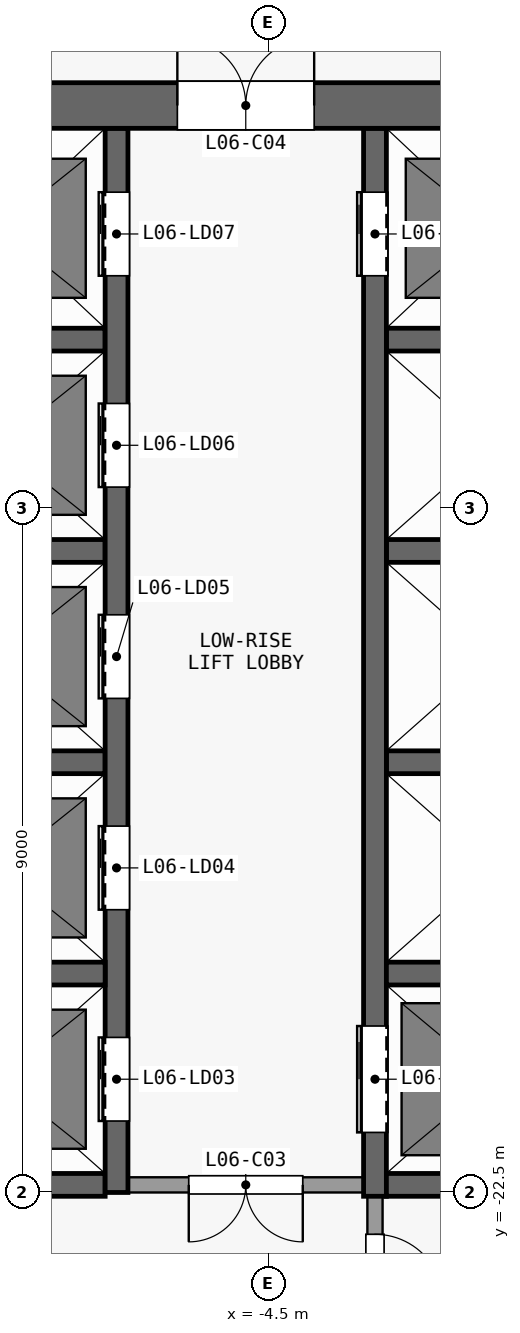
"""IFC4 building model, lengths in metres.
Left out: names, types, materials, properties, quantities, classifications, styles, units other than length and angle.
Written with IfcOpenShell. Run it as: python <this file> out.ifc"""

import sys

from ifc_helpers import new_model, si_unit, direction, frame, frame_2d, origin, place, context, subcontext, project, spatial, rectangle, extrude, element, fill, save


model = new_model("IFC4")
c1 = context("Model", 3, precision=1e-05, world=origin(), true_north=direction((0.0, 1.0)))
c2 = subcontext(c1, "Body", "Model", "MODEL_VIEW")
j1 = project(units=[si_unit("LENGTHUNIT", "METRE"), si_unit("PLANEANGLEUNIT", "RADIAN")], contexts=[c1])
p1 = place(None, origin())
s1 = spatial("IfcSite", under=j1, at=p1, CompositionType="ELEMENT")
p2 = place(p1, origin())
s2 = spatial("IfcBuilding", under=s1, at=p2, CompositionType="ELEMENT")
p3 = place(p2, frame((0.0, 0.0, 32.5)))
s3 = spatial("IfcBuildingStorey", under=s2, at=p3, CompositionType="ELEMENT", Elevation=32.5)
p4 = place(p3, frame((-13.5, -8.2, 0.0), z_axis=(0.0, 0.0, 1.0), x_axis=(1.0, 0.0, 0.0)))
e1 = element("IfcWall", 1, at=p4, inside=s3, PredefinedType="SHEAR", context=c2, shape_type="SweptSolid", body=[
    extrude(rectangle(XDim=27.0, YDim=0.6, at=frame_2d((13.5, 0.0))), origin(), (0.0, 0.0, 1.0), 3.3),
])
p5 = place(p4, frame((7.8, 0.0, 0.0)))
e2 = element("IfcOpeningElement", 2, at=p5, cuts=e1, PredefinedType="OPENING", context=c2, shape_type="SweptSolid", body=[
    extrude(rectangle(XDim=1.8, YDim=2.1, at=frame_2d((0.9, 1.05))), frame((0.0, 0.31, 0.0), z_axis=(0.0, -1.0, 0.0), x_axis=(1.0, 0.0, 0.0)), (0.0, 0.0, 1.0), 0.62),
])
p6 = place(p4, frame((17.4, 0.0, 0.0)))
e3 = element("IfcOpeningElement", 3, at=p6, cuts=e1, PredefinedType="OPENING", context=c2, shape_type="SweptSolid", body=[
    extrude(rectangle(XDim=1.8, YDim=2.1, at=frame_2d((0.9, 1.05))), frame((0.0, 0.31, 0.0), z_axis=(0.0, -1.0, 0.0), x_axis=(1.0, 0.0, 0.0)), (0.0, 0.0, 1.0), 0.62),
])
p7 = place(p4, frame((2.725, 0.0, 0.0)))
e4 = element("IfcOpeningElement", 4, at=p7, cuts=e1, PredefinedType="OPENING", context=c2, shape_type="SweptSolid", body=[
    extrude(rectangle(XDim=0.9, YDim=2.1, at=frame_2d((0.45, 1.05))), frame((0.0, 0.31, 0.0), z_axis=(0.0, -1.0, 0.0), x_axis=(1.0, 0.0, 0.0)), (0.0, 0.0, 1.0), 0.62),
])
p8 = place(p4, frame((23.375, 0.0, 0.0)))
e5 = element("IfcOpeningElement", 5, at=p8, cuts=e1, PredefinedType="OPENING", context=c2, shape_type="SweptSolid", body=[
    extrude(rectangle(XDim=0.9, YDim=2.1, at=frame_2d((0.45, 1.05))), frame((0.0, 0.31, 0.0), z_axis=(0.0, -1.0, 0.0), x_axis=(1.0, 0.0, 0.0)), (0.0, 0.0, 1.0), 0.62),
])
p9 = place(p3, frame((-9.45, -22.4, 0.0), z_axis=(0.0, 0.0, 1.0), x_axis=(1.0, 0.0, 0.0)))
e6 = element("IfcWall", 6, at=p9, inside=s3, PredefinedType="SHEAR", context=c2, shape_type="SweptSolid", body=[
    extrude(rectangle(XDim=2.8, YDim=0.3, at=frame_2d((1.4, 0.0))), origin(), (0.0, 0.0, 1.0), 3.3),
])
p10 = place(p3, frame((-3.25, -22.4, 0.0), z_axis=(0.0, 0.0, 1.0), x_axis=(-1.0, 0.0, 0.0)))
e7 = element("IfcWall", 7, at=p10, inside=s3, PredefinedType="PARTITIONING", context=c2, shape_type="SweptSolid", body=[
    extrude(rectangle(XDim=3.1, YDim=0.2, at=frame_2d((1.55, 0.0))), origin(), (0.0, 0.0, 1.0), 3.3),
])
p11 = place(p10, frame((0.8, 0.0, 0.0)))
e8 = element("IfcOpeningElement", 8, at=p11, cuts=e7, PredefinedType="OPENING", context=c2, shape_type="SweptSolid", body=[
    extrude(rectangle(XDim=1.5, YDim=2.1, at=frame_2d((0.75, 1.05))), frame((0.0, 0.11, 0.0), z_axis=(0.0, -1.0, 0.0), x_axis=(1.0, 0.0, 0.0)), (0.0, 0.0, 1.0), 0.22),
])
p12 = place(p3, frame((-2.95, -22.4, 0.0), z_axis=(0.0, 0.0, 1.0), x_axis=(1.0, 0.0, 0.0)))
e9 = element("IfcWall", 9, at=p12, inside=s3, PredefinedType="SHEAR", context=c2, shape_type="SweptSolid", body=[
    extrude(rectangle(XDim=6.2, YDim=0.3, at=frame_2d((3.1, 0.0))), origin(), (0.0, 0.0, 1.0), 3.3),
])
for number, where, z_axis, x_axis in (
    (10, (-9.45, -19.62, 0.0), (0.0, 0.0, 1.0), (1.0, 0.0, 0.0)),
    (11, (-2.95, -19.62, 0.0), (0.0, 0.0, 1.0), (1.0, 0.0, 0.0)),
    (12, (-9.45, -16.84, 0.0), (0.0, 0.0, 1.0), (1.0, 0.0, 0.0)),
    (13, (-2.95, -16.84, 0.0), (0.0, 0.0, 1.0), (1.0, 0.0, 0.0)),
    (14, (-9.45, -14.06, 0.0), (0.0, 0.0, 1.0), (1.0, 0.0, 0.0)),
    (15, (-2.95, -14.06, 0.0), (0.0, 0.0, 1.0), (1.0, 0.0, 0.0)),
    (16, (-9.45, -11.28, 0.0), (0.0, 0.0, 1.0), (1.0, 0.0, 0.0)),
    (17, (-2.95, -11.28, 0.0), (0.0, 0.0, 1.0), (1.0, 0.0, 0.0)),
):
    element("IfcWall", number, at=place(p3, frame(where, z_axis=z_axis, x_axis=x_axis)), inside=s3, PredefinedType="SHEAR", context=c2, shape_type="SweptSolid", body=[
        extrude(rectangle(XDim=2.8, YDim=0.3, at=frame_2d((1.4, 0.0))), origin(), (0.0, 0.0, 1.0), 3.3),
    ])
p13 = place(p3, frame((-6.5, -22.5, 0.0), z_axis=(0.0, 0.0, 1.0), x_axis=(0.0, 1.0, 0.0)))
e18 = element("IfcWall", 18, at=p13, inside=s3, PredefinedType="SHEAR", context=c2, shape_type="SweptSolid", body=[
    extrude(rectangle(XDim=14.0, YDim=0.3, at=frame_2d((7.0, 0.0))), origin(), (0.0, 0.0, 1.0), 3.3),
])
p14 = place(p13, frame((0.94, 0.0, 0.0)))
e19 = element("IfcOpeningElement", 19, at=p14, cuts=e18, PredefinedType="OPENING", context=c2, shape_type="SweptSolid", body=[
    extrude(rectangle(XDim=1.1, YDim=2.1, at=frame_2d((0.55, 1.05))), frame((0.0, 0.16, 0.0), z_axis=(0.0, -1.0, 0.0), x_axis=(1.0, 0.0, 0.0)), (0.0, 0.0, 1.0), 0.32),
])
p15 = place(p13, frame((3.72, 0.0, 0.0)))
e20 = element("IfcOpeningElement", 20, at=p15, cuts=e18, PredefinedType="OPENING", context=c2, shape_type="SweptSolid", body=[
    extrude(rectangle(XDim=1.1, YDim=2.1, at=frame_2d((0.55, 1.05))), frame((0.0, 0.16, 0.0), z_axis=(0.0, -1.0, 0.0), x_axis=(1.0, 0.0, 0.0)), (0.0, 0.0, 1.0), 0.32),
])
p16 = place(p13, frame((6.5, 0.0, 0.0)))
e21 = element("IfcOpeningElement", 21, at=p16, cuts=e18, PredefinedType="OPENING", context=c2, shape_type="SweptSolid", body=[
    extrude(rectangle(XDim=1.1, YDim=2.1, at=frame_2d((0.55, 1.05))), frame((0.0, 0.16, 0.0), z_axis=(0.0, -1.0, 0.0), x_axis=(1.0, 0.0, 0.0)), (0.0, 0.0, 1.0), 0.32),
])
p17 = place(p13, frame((9.28, 0.0, 0.0)))
e22 = element("IfcOpeningElement", 22, at=p17, cuts=e18, PredefinedType="OPENING", context=c2, shape_type="SweptSolid", body=[
    extrude(rectangle(XDim=1.1, YDim=2.1, at=frame_2d((0.55, 1.05))), frame((0.0, 0.16, 0.0), z_axis=(0.0, -1.0, 0.0), x_axis=(1.0, 0.0, 0.0)), (0.0, 0.0, 1.0), 0.32),
])
p18 = place(p13, frame((12.06, 0.0, 0.0)))
e23 = element("IfcOpeningElement", 23, at=p18, cuts=e18, PredefinedType="OPENING", context=c2, shape_type="SweptSolid", body=[
    extrude(rectangle(XDim=1.1, YDim=2.1, at=frame_2d((0.55, 1.05))), frame((0.0, 0.16, 0.0), z_axis=(0.0, -1.0, 0.0), x_axis=(1.0, 0.0, 0.0)), (0.0, 0.0, 1.0), 0.32),
])
p19 = place(p3, frame((-3.1, -22.55, 0.0), z_axis=(0.0, 0.0, 1.0), x_axis=(0.0, -1.0, 0.0)))
e24 = element("IfcWall", 24, at=p19, inside=s3, PredefinedType="PARTITIONING", context=c2, shape_type="SweptSolid", body=[
    extrude(rectangle(XDim=2.05, YDim=0.2, at=frame_2d((1.025, 0.0))), origin(), (0.0, 0.0, 1.0), 3.3),
])
p20 = place(p19, frame((0.5, 0.0, 0.0)))
e25 = element("IfcOpeningElement", 25, at=p20, cuts=e24, PredefinedType="OPENING", context=c2, shape_type="SweptSolid", body=[
    extrude(rectangle(XDim=0.9, YDim=2.1, at=frame_2d((0.45, 1.05))), frame((0.0, 0.11, 0.0), z_axis=(0.0, -1.0, 0.0), x_axis=(1.0, 0.0, 0.0)), (0.0, 0.0, 1.0), 0.22),
])
p21 = place(p3, frame((-3.1, -22.55, 0.0), z_axis=(0.0, 0.0, 1.0), x_axis=(0.0, 1.0, 0.0)))
e26 = element("IfcWall", 26, at=p21, inside=s3, PredefinedType="SHEAR", context=c2, shape_type="SweptSolid", body=[
    extrude(rectangle(XDim=14.05, YDim=0.3, at=frame_2d((7.025, 0.0))), origin(), (0.0, 0.0, 1.0), 3.3),
])
p22 = place(p21, frame((12.11, 0.0, 0.0)))
e27 = element("IfcOpeningElement", 27, at=p22, cuts=e26, PredefinedType="OPENING", context=c2, shape_type="SweptSolid", body=[
    extrude(rectangle(XDim=1.1, YDim=2.1, at=frame_2d((0.55, 1.05))), frame((0.0, 0.16, 0.0), z_axis=(0.0, -1.0, 0.0), x_axis=(1.0, 0.0, 0.0)), (0.0, 0.0, 1.0), 0.32),
])
p23 = place(p21, frame((0.84, 0.0, 0.0)))
e28 = element("IfcOpeningElement", 28, at=p23, cuts=e26, PredefinedType="OPENING", context=c2, shape_type="SweptSolid", body=[
    extrude(rectangle(XDim=1.4, YDim=2.1, at=frame_2d((0.7, 1.05))), frame((0.0, 0.16, 0.0), z_axis=(0.0, -1.0, 0.0), x_axis=(1.0, 0.0, 0.0)), (0.0, 0.0, 1.0), 0.32),
])
p24 = place(p14, origin())
e29 = element("IfcDoor", 29, at=p24, inside=s3, OperationType="DOUBLE_DOOR_SLIDING", PredefinedType="DOOR", context=c2, shape_type="SweptSolid", body=[
    extrude(rectangle(XDim=1.1, YDim=2.1, at=frame_2d((0.55, 1.05))), frame((0.0, 0.025, 0.0), z_axis=(0.0, -1.0, 0.0), x_axis=(1.0, 0.0, 0.0)), (0.0, 0.0, 1.0), 0.05),
])
fill(e19, e29)
p25 = place(p15, origin())
e30 = element("IfcDoor", 30, at=p25, inside=s3, OperationType="DOUBLE_DOOR_SLIDING", PredefinedType="DOOR", context=c2, shape_type="SweptSolid", body=[
    extrude(rectangle(XDim=1.1, YDim=2.1, at=frame_2d((0.55, 1.05))), frame((0.0, 0.025, 0.0), z_axis=(0.0, -1.0, 0.0), x_axis=(1.0, 0.0, 0.0)), (0.0, 0.0, 1.0), 0.05),
])
fill(e20, e30)
p26 = place(p16, origin())
e31 = element("IfcDoor", 31, at=p26, inside=s3, OperationType="DOUBLE_DOOR_SLIDING", PredefinedType="DOOR", context=c2, shape_type="SweptSolid", body=[
    extrude(rectangle(XDim=1.1, YDim=2.1, at=frame_2d((0.55, 1.05))), frame((0.0, 0.025, 0.0), z_axis=(0.0, -1.0, 0.0), x_axis=(1.0, 0.0, 0.0)), (0.0, 0.0, 1.0), 0.05),
])
fill(e21, e31)
p27 = place(p17, origin())
e32 = element("IfcDoor", 32, at=p27, inside=s3, OperationType="DOUBLE_DOOR_SLIDING", PredefinedType="DOOR", context=c2, shape_type="SweptSolid", body=[
    extrude(rectangle(XDim=1.1, YDim=2.1, at=frame_2d((0.55, 1.05))), frame((0.0, 0.025, 0.0), z_axis=(0.0, -1.0, 0.0), x_axis=(1.0, 0.0, 0.0)), (0.0, 0.0, 1.0), 0.05),
])
fill(e22, e32)
p28 = place(p18, origin())
e33 = element("IfcDoor", 33, at=p28, inside=s3, OperationType="DOUBLE_DOOR_SLIDING", PredefinedType="DOOR", context=c2, shape_type="SweptSolid", body=[
    extrude(rectangle(XDim=1.1, YDim=2.1, at=frame_2d((0.55, 1.05))), frame((0.0, 0.025, 0.0), z_axis=(0.0, -1.0, 0.0), x_axis=(1.0, 0.0, 0.0)), (0.0, 0.0, 1.0), 0.05),
])
fill(e23, e33)
p29 = place(p22, origin())
e34 = element("IfcDoor", 34, at=p29, inside=s3, OperationType="DOUBLE_DOOR_SLIDING", PredefinedType="DOOR", context=c2, shape_type="SweptSolid", body=[
    extrude(rectangle(XDim=1.1, YDim=2.1, at=frame_2d((0.55, 1.05))), frame((0.0, 0.025, 0.0), z_axis=(0.0, -1.0, 0.0), x_axis=(1.0, 0.0, 0.0)), (0.0, 0.0, 1.0), 0.05),
])
fill(e27, e34)
p30 = place(p23, origin())
e35 = element("IfcDoor", 35, at=p30, inside=s3, OperationType="DOUBLE_DOOR_SLIDING", PredefinedType="DOOR", context=c2, shape_type="SweptSolid", body=[
    extrude(rectangle(XDim=1.4, YDim=2.1, at=frame_2d((0.7, 1.05))), frame((0.0, 0.025, 0.0), z_axis=(0.0, -1.0, 0.0), x_axis=(1.0, 0.0, 0.0)), (0.0, 0.0, 1.0), 0.05),
])
fill(e28, e35)
p31 = place(p11, origin())
e36 = element("IfcDoor", 36, at=p31, inside=s3, OperationType="DOUBLE_DOOR_SINGLE_SWING", PredefinedType="DOOR", context=c2, shape_type="SweptSolid", body=[
    extrude(rectangle(XDim=1.5, YDim=2.1, at=frame_2d((0.75, 1.05))), frame((0.0, 0.025, 0.0), z_axis=(0.0, -1.0, 0.0), x_axis=(1.0, 0.0, 0.0)), (0.0, 0.0, 1.0), 0.05),
])
fill(e8, e36)
p32 = place(p5, origin())
e37 = element("IfcDoor", 37, at=p32, inside=s3, OperationType="DOUBLE_DOOR_SINGLE_SWING", PredefinedType="DOOR", context=c2, shape_type="SweptSolid", body=[
    extrude(rectangle(XDim=1.8, YDim=2.1, at=frame_2d((0.9, 1.05))), frame((0.0, 0.025, 0.0), z_axis=(0.0, -1.0, 0.0), x_axis=(1.0, 0.0, 0.0)), (0.0, 0.0, 1.0), 0.05),
])
fill(e2, e37)
p33 = place(p20, origin())
e38 = element("IfcDoor", 38, at=p33, inside=s3, OperationType="SINGLE_SWING_RIGHT", PredefinedType="DOOR", context=c2, shape_type="SweptSolid", body=[
    extrude(rectangle(XDim=0.9, YDim=2.1, at=frame_2d((0.45, 1.05))), frame((0.0, 0.025, 0.0), z_axis=(0.0, -1.0, 0.0), x_axis=(1.0, 0.0, 0.0)), (0.0, 0.0, 1.0), 0.05),
])
fill(e25, e38)
save(model, sys.argv[1])
